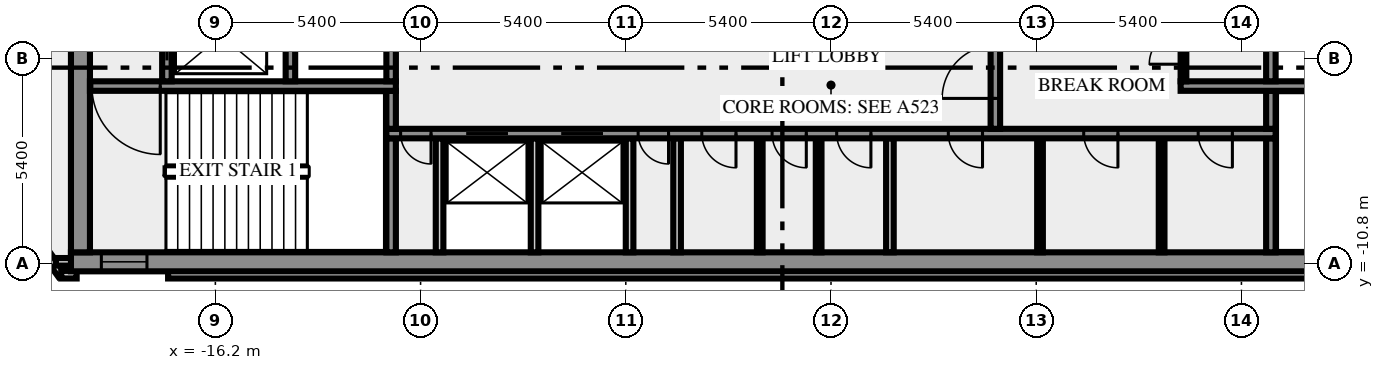
"""IFC4 building model, lengths in metres.
Left out: names, types, materials, properties, quantities, classifications, styles, units other than length and angle.
Written with IfcOpenShell. Run it as: python <this file> out.ifc"""

import sys

from ifc_helpers import new_model, si_unit, direction, frame, frame_2d, origin, place, context, subcontext, project, spatial, rectangle, extrude, element, fill, save


model = new_model("IFC4")
c1 = context("Model", 3, precision=1e-05, world=origin(), true_north=direction((0.0, 1.0)))
c2 = subcontext(c1, "Body", "Model", "MODEL_VIEW")
j1 = project(units=[si_unit("LENGTHUNIT", "METRE"), si_unit("PLANEANGLEUNIT", "RADIAN")], contexts=[c1])
p1 = place(None, origin())
s1 = spatial("IfcSite", under=j1, at=p1, CompositionType="ELEMENT")
p2 = place(p1, origin())
s2 = spatial("IfcBuilding", under=s1, at=p2, CompositionType="ELEMENT")
p3 = place(p2, frame((0.0, 0.0, 331.0)))
s3 = spatial("IfcBuildingStorey", under=s2, at=p3, CompositionType="ELEMENT", Elevation=331.0)
p4 = place(p3, frame((-21.833, -8.909, 0.0), z_axis=(0.0, 0.0, 1.0), x_axis=(0.587766567315, -0.809030569476, 0.0)))
e1 = element("IfcWall", 1, at=p4, inside=s3, PredefinedType="SOLIDWALL", context=c2, shape_type="SweptSolid", body=[
    extrude(rectangle(XDim=2.688, YDim=0.2, at=frame_2d((1.344, 0.0))), origin(), (0.0, 0.0, 1.0), 3.65),
])
p5 = place(p3, frame((-20.256, -11.088, 0.0), z_axis=(0.0, 0.0, 1.0), x_axis=(1.0, 0.0, 0.0)))
e2 = element("IfcWall", 2, at=p5, inside=s3, PredefinedType="SOLIDWALL", context=c2, shape_type="SweptSolid", body=[
    extrude(rectangle(XDim=0.406, YDim=0.2, at=frame_2d((0.203, 0.0))), origin(), (0.0, 0.0, 1.0), 3.65),
])
p6 = place(p3, frame((-17.444, -11.088, 0.0), z_axis=(0.0, 0.0, 1.0), x_axis=(1.0, 0.0, 0.0)))
e3 = element("IfcWall", 3, at=p6, inside=s3, PredefinedType="SOLIDWALL", context=c2, shape_type="SweptSolid", body=[
    extrude(rectangle(XDim=34.888, YDim=0.2, at=frame_2d((17.444, 0.0))), origin(), (0.0, 0.0, 1.0), 3.65),
])
p7 = place(p3, frame((-19.98, -10.75, 0.0), z_axis=(0.0, 0.0, 1.0), x_axis=(-1.0, 0.0, 0.0)))
e4 = element("IfcWall", 4, at=p7, inside=s3, PredefinedType="SOLIDWALL", context=c2, shape_type="SweptSolid", body=[
    extrude(rectangle(XDim=0.417, YDim=0.2, at=frame_2d((0.208, 0.0))), origin(), (0.0, 0.0, 1.0), 3.65),
])
p8 = place(p3, frame((-20.0, -10.75, 0.0), z_axis=(0.0, 0.0, 1.0), x_axis=(1.0, 0.0, 0.0)))
e5 = element("IfcWall", 5, at=p8, inside=s3, PredefinedType="SHEAR", context=c2, shape_type="SweptSolid", body=[
    extrude(rectangle(XDim=40.0, YDim=0.5, at=frame_2d((20.0, 0.0))), origin(), (0.0, 0.0, 1.0), 3.65),
])
p9 = place(p8, frame((0.8, 0.0, 1.0)))
e6 = element("IfcOpeningElement", 6, at=p9, cuts=e5, PredefinedType="OPENING", context=c2, shape_type="SweptSolid", body=[
    extrude(rectangle(XDim=1.2, YDim=1.2, at=frame_2d((0.6, 0.6))), frame((0.0, 0.26, 0.0), z_axis=(0.0, -1.0, 0.0), x_axis=(1.0, 0.0, 0.0)), (0.0, 0.0, 1.0), 0.52),
])
p10 = place(p8, frame((38.0, 0.0, 1.0)))
e7 = element("IfcOpeningElement", 7, at=p10, cuts=e5, PredefinedType="OPENING", context=c2, shape_type="SweptSolid", body=[
    extrude(rectangle(XDim=1.2, YDim=1.2, at=frame_2d((0.6, 0.6))), frame((0.0, 0.26, 0.0), z_axis=(0.0, -1.0, 0.0), x_axis=(1.0, 0.0, 0.0)), (0.0, 0.0, 1.0), 0.52),
])
p11 = place(p3, frame((-19.75, -10.5, 0.0), z_axis=(0.0, 0.0, 1.0), x_axis=(0.0, 1.0, 0.0)))
e8 = element("IfcWall", 8, at=p11, inside=s3, PredefinedType="SHEAR", context=c2, shape_type="SweptSolid", body=[
    extrude(rectangle(XDim=8.8, YDim=0.5, at=frame_2d((4.4, 0.0))), origin(), (0.0, 0.0, 1.0), 3.65),
])
p12 = place(p3, frame((-11.575, -10.5, 0.0), z_axis=(0.0, 0.0, 1.0), x_axis=(0.0, 1.0, 0.0)))
e9 = element("IfcWall", 9, at=p12, inside=s3, PredefinedType="SHEAR", context=c2, shape_type="SweptSolid", body=[
    extrude(rectangle(XDim=3.0, YDim=0.25, at=frame_2d((1.5, 0.0))), origin(), (0.0, 0.0, 1.0), 3.65),
])
for number, where, z_axis, x_axis in (
    (10, (-10.3, -10.5, 0.0), (0.0, 0.0, 1.0), (0.0, 1.0, 0.0)),
    (11, (-7.8, -10.5, 0.0), (0.0, 0.0, 1.0), (0.0, 1.0, 0.0)),
    (12, (-5.3, -10.5, 0.0), (0.0, 0.0, 1.0), (0.0, 1.0, 0.0)),
    (13, (-4.05, -10.5, 0.0), (0.0, 0.0, 1.0), (0.0, 1.0, 0.0)),
):
    element("IfcWall", number, at=place(p3, frame(where, z_axis=z_axis, x_axis=x_axis)), inside=s3, PredefinedType="SOLIDWALL", context=c2, shape_type="SweptSolid", body=[
        extrude(rectangle(XDim=3.0, YDim=0.2, at=frame_2d((1.5, 0.0))), origin(), (0.0, 0.0, 1.0), 3.65),
    ])
for number, where, z_axis, x_axis in (
    (14, (-1.875, -10.5, 0.0), (0.0, 0.0, 1.0), (0.0, 1.0, 0.0)),
    (15, (-0.325, -10.5, 0.0), (0.0, 0.0, 1.0), (0.0, 1.0, 0.0)),
):
    element("IfcWall", number, at=place(p3, frame(where, z_axis=z_axis, x_axis=x_axis)), inside=s3, PredefinedType="PARTITIONING", context=c2, shape_type="SweptSolid", body=[
        extrude(rectangle(XDim=3.0, YDim=0.15, at=frame_2d((1.5, 0.0))), origin(), (0.0, 0.0, 1.0), 3.65),
    ])
p13 = place(p3, frame((1.55, -10.5, 0.0), z_axis=(0.0, 0.0, 1.0), x_axis=(0.0, 1.0, 0.0)))
e16 = element("IfcWall", 16, at=p13, inside=s3, PredefinedType="SOLIDWALL", context=c2, shape_type="SweptSolid", body=[
    extrude(rectangle(XDim=3.0, YDim=0.2, at=frame_2d((1.5, 0.0))), origin(), (0.0, 0.0, 1.0), 3.65),
])
for number, where, z_axis, x_axis in (
    (17, (5.5, -10.5, 0.0), (0.0, 0.0, 1.0), (0.0, 1.0, 0.0)),
    (18, (8.7, -10.5, 0.0), (0.0, 0.0, 1.0), (0.0, 1.0, 0.0)),
):
    element("IfcWall", number, at=place(p3, frame(where, z_axis=z_axis, x_axis=x_axis)), inside=s3, PredefinedType="PARTITIONING", context=c2, shape_type="SweptSolid", body=[
        extrude(rectangle(XDim=3.0, YDim=0.15, at=frame_2d((1.5, 0.0))), origin(), (0.0, 0.0, 1.0), 3.65),
    ])
p14 = place(p3, frame((11.575, -10.5, 0.0), z_axis=(0.0, 0.0, 1.0), x_axis=(0.0, 1.0, 0.0)))
e19 = element("IfcWall", 19, at=p14, inside=s3, PredefinedType="SHEAR", context=c2, shape_type="SweptSolid", body=[
    extrude(rectangle(XDim=3.0, YDim=0.25, at=frame_2d((1.5, 0.0))), origin(), (0.0, 0.0, 1.0), 3.65),
])
p15 = place(p3, frame((11.7, -7.375, 0.0), z_axis=(0.0, 0.0, 1.0), x_axis=(-1.0, 0.0, 0.0)))
e20 = element("IfcWall", 20, at=p15, inside=s3, PredefinedType="SHEAR", context=c2, shape_type="SweptSolid", body=[
    extrude(rectangle(XDim=23.4, YDim=0.25, at=frame_2d((11.7, 0.0))), origin(), (0.0, 0.0, 1.0), 3.65),
])
p16 = place(p15, frame((22.225, 0.0, 0.0)))
e21 = element("IfcOpeningElement", 21, at=p16, cuts=e20, PredefinedType="OPENING", context=c2, shape_type="SweptSolid", body=[
    extrude(rectangle(XDim=0.8, YDim=2.1, at=frame_2d((0.4, 1.05))), frame((0.0, 0.135, 0.0), z_axis=(0.0, -1.0, 0.0), x_axis=(1.0, 0.0, 0.0)), (0.0, 0.0, 1.0), 0.27),
])
p17 = place(p15, frame((20.2, 0.0, 0.0)))
e22 = element("IfcOpeningElement", 22, at=p17, cuts=e20, PredefinedType="OPENING", context=c2, shape_type="SweptSolid", body=[
    extrude(rectangle(XDim=1.1, YDim=2.1, at=frame_2d((0.55, 1.05))), frame((0.0, 0.135, 0.0), z_axis=(0.0, -1.0, 0.0), x_axis=(1.0, 0.0, 0.0)), (0.0, 0.0, 1.0), 0.27),
])
p18 = place(p15, frame((17.7, 0.0, 0.0)))
e23 = element("IfcOpeningElement", 23, at=p18, cuts=e20, PredefinedType="OPENING", context=c2, shape_type="SweptSolid", body=[
    extrude(rectangle(XDim=1.1, YDim=2.1, at=frame_2d((0.55, 1.05))), frame((0.0, 0.135, 0.0), z_axis=(0.0, -1.0, 0.0), x_axis=(1.0, 0.0, 0.0)), (0.0, 0.0, 1.0), 0.27),
])
p19 = place(p15, frame((15.975, 0.0, 0.0)))
e24 = element("IfcOpeningElement", 24, at=p19, cuts=e20, PredefinedType="OPENING", context=c2, shape_type="SweptSolid", body=[
    extrude(rectangle(XDim=0.8, YDim=2.1, at=frame_2d((0.4, 1.05))), frame((0.0, 0.135, 0.0), z_axis=(0.0, -1.0, 0.0), x_axis=(1.0, 0.0, 0.0)), (0.0, 0.0, 1.0), 0.27),
])
p20 = place(p15, frame((14.2, 0.0, 0.0)))
e25 = element("IfcOpeningElement", 25, at=p20, cuts=e20, PredefinedType="OPENING", context=c2, shape_type="SweptSolid", body=[
    extrude(rectangle(XDim=0.9, YDim=2.1, at=frame_2d((0.45, 1.05))), frame((0.0, 0.135, 0.0), z_axis=(0.0, -1.0, 0.0), x_axis=(1.0, 0.0, 0.0)), (0.0, 0.0, 1.0), 0.27),
])
p21 = place(p15, frame((12.35, 0.0, 0.0)))
e26 = element("IfcOpeningElement", 26, at=p21, cuts=e20, PredefinedType="OPENING", context=c2, shape_type="SweptSolid", body=[
    extrude(rectangle(XDim=0.9, YDim=2.1, at=frame_2d((0.45, 1.05))), frame((0.0, 0.135, 0.0), z_axis=(0.0, -1.0, 0.0), x_axis=(1.0, 0.0, 0.0)), (0.0, 0.0, 1.0), 0.27),
])
p22 = place(p15, frame((10.65, 0.0, 0.0)))
e27 = element("IfcOpeningElement", 27, at=p22, cuts=e20, PredefinedType="OPENING", context=c2, shape_type="SweptSolid", body=[
    extrude(rectangle(XDim=0.9, YDim=2.1, at=frame_2d((0.45, 1.05))), frame((0.0, 0.135, 0.0), z_axis=(0.0, -1.0, 0.0), x_axis=(1.0, 0.0, 0.0)), (0.0, 0.0, 1.0), 0.27),
])
p23 = place(p15, frame((7.713, 0.0, 0.0)))
e28 = element("IfcOpeningElement", 28, at=p23, cuts=e20, PredefinedType="OPENING", context=c2, shape_type="SweptSolid", body=[
    extrude(rectangle(XDim=0.9, YDim=2.1, at=frame_2d((0.45, 1.05))), frame((0.0, 0.135, 0.0), z_axis=(0.0, -1.0, 0.0), x_axis=(1.0, 0.0, 0.0)), (0.0, 0.0, 1.0), 0.27),
])
p24 = place(p15, frame((4.15, 0.0, 0.0)))
e29 = element("IfcOpeningElement", 29, at=p24, cuts=e20, PredefinedType="OPENING", context=c2, shape_type="SweptSolid", body=[
    extrude(rectangle(XDim=0.9, YDim=2.1, at=frame_2d((0.45, 1.05))), frame((0.0, 0.135, 0.0), z_axis=(0.0, -1.0, 0.0), x_axis=(1.0, 0.0, 0.0)), (0.0, 0.0, 1.0), 0.27),
])
p25 = place(p15, frame((1.138, 0.0, 0.0)))
e30 = element("IfcOpeningElement", 30, at=p25, cuts=e20, PredefinedType="OPENING", context=c2, shape_type="SweptSolid", body=[
    extrude(rectangle(XDim=0.9, YDim=2.1, at=frame_2d((0.45, 1.05))), frame((0.0, 0.135, 0.0), z_axis=(0.0, -1.0, 0.0), x_axis=(1.0, 0.0, 0.0)), (0.0, 0.0, 1.0), 0.27),
])
p26 = place(p3, frame((-11.575, -7.25, 0.0), z_axis=(0.0, 0.0, 1.0), x_axis=(0.0, 1.0, 0.0)))
e31 = element("IfcWall", 31, at=p26, inside=s3, PredefinedType="SHEAR", context=c2, shape_type="SweptSolid", body=[
    extrude(rectangle(XDim=1.0, YDim=0.25, at=frame_2d((0.5, 0.0))), origin(), (0.0, 0.0, 1.0), 3.65),
])
p27 = place(p3, frame((4.325, -7.25, 0.0), z_axis=(0.0, 0.0, 1.0), x_axis=(0.0, 1.0, 0.0)))
e32 = element("IfcWall", 32, at=p27, inside=s3, PredefinedType="SHEAR", context=c2, shape_type="SweptSolid", body=[
    extrude(rectangle(XDim=3.0, YDim=0.25, at=frame_2d((1.5, 0.0))), origin(), (0.0, 0.0, 1.0), 3.65),
])
p28 = place(p27, frame((0.8, 0.0, 0.0)))
e33 = element("IfcOpeningElement", 33, at=p28, cuts=e32, PredefinedType="OPENING", context=c2, shape_type="SweptSolid", body=[
    extrude(rectangle(XDim=1.4, YDim=2.1, at=frame_2d((0.7, 1.05))), frame((0.0, 0.135, 0.0), z_axis=(0.0, -1.0, 0.0), x_axis=(1.0, 0.0, 0.0)), (0.0, 0.0, 1.0), 0.27),
])
p29 = place(p3, frame((11.575, -7.25, 0.0), z_axis=(0.0, 0.0, 1.0), x_axis=(0.0, 1.0, 0.0)))
e34 = element("IfcWall", 34, at=p29, inside=s3, PredefinedType="SHEAR", context=c2, shape_type="SweptSolid", body=[
    extrude(rectangle(XDim=1.0, YDim=0.25, at=frame_2d((0.5, 0.0))), origin(), (0.0, 0.0, 1.0), 3.65),
])
p30 = place(p3, frame((-11.45, -6.125, 0.0), z_axis=(0.0, 0.0, 1.0), x_axis=(-1.0, 0.0, 0.0)))
e35 = element("IfcWall", 35, at=p30, inside=s3, PredefinedType="SHEAR", context=c2, shape_type="SweptSolid", body=[
    extrude(rectangle(XDim=8.05, YDim=0.25, at=frame_2d((4.025, 0.0))), origin(), (0.0, 0.0, 1.0), 3.65),
])
p31 = place(p30, frame((6.2, 0.0, 0.0)))
e36 = element("IfcOpeningElement", 36, at=p31, cuts=e35, PredefinedType="OPENING", context=c2, shape_type="SweptSolid", body=[
    extrude(rectangle(XDim=1.8, YDim=2.1, at=frame_2d((0.9, 1.05))), frame((0.0, 0.135, 0.0), z_axis=(0.0, -1.0, 0.0), x_axis=(1.0, 0.0, 0.0)), (0.0, 0.0, 1.0), 0.27),
])
p32 = place(p3, frame((20.0, -6.125, 0.0), z_axis=(0.0, 0.0, 1.0), x_axis=(-1.0, 0.0, 0.0)))
e37 = element("IfcWall", 37, at=p32, inside=s3, PredefinedType="SHEAR", context=c2, shape_type="SweptSolid", body=[
    extrude(rectangle(XDim=10.8, YDim=0.25, at=frame_2d((5.4, 0.0))), origin(), (0.0, 0.0, 1.0), 3.65),
])
p33 = place(p32, frame((0.55, 0.0, 0.0)))
e38 = element("IfcOpeningElement", 38, at=p33, cuts=e37, PredefinedType="OPENING", context=c2, shape_type="SweptSolid", body=[
    extrude(rectangle(XDim=1.8, YDim=2.1, at=frame_2d((0.9, 1.05))), frame((0.0, 0.135, 0.0), z_axis=(0.0, -1.0, 0.0), x_axis=(1.0, 0.0, 0.0)), (0.0, 0.0, 1.0), 0.27),
])
p34 = place(p3, frame((-17.475, -6.0, 0.0), z_axis=(0.0, 0.0, 1.0), x_axis=(0.0, 1.0, 0.0)))
e39 = element("IfcWall", 39, at=p34, inside=s3, PredefinedType="SHEAR", context=c2, shape_type="SweptSolid", body=[
    extrude(rectangle(XDim=4.3, YDim=0.25, at=frame_2d((2.15, 0.0))), origin(), (0.0, 0.0, 1.0), 3.65),
])
p35 = place(p34, frame((0.55, 0.0, 0.0)))
e40 = element("IfcOpeningElement", 40, at=p35, cuts=e39, PredefinedType="OPENING", context=c2, shape_type="SweptSolid", body=[
    extrude(rectangle(XDim=1.3, YDim=2.1, at=frame_2d((0.65, 1.05))), frame((0.0, 0.135, 0.0), z_axis=(0.0, -1.0, 0.0), x_axis=(1.0, 0.0, 0.0)), (0.0, 0.0, 1.0), 0.27),
])
p36 = place(p3, frame((-14.225, -6.0, 0.0), z_axis=(0.0, 0.0, 1.0), x_axis=(0.0, 1.0, 0.0)))
e41 = element("IfcWall", 41, at=p36, inside=s3, PredefinedType="SHEAR", context=c2, shape_type="SweptSolid", body=[
    extrude(rectangle(XDim=4.3, YDim=0.25, at=frame_2d((2.15, 0.0))), origin(), (0.0, 0.0, 1.0), 3.65),
])
p37 = place(p3, frame((-11.575, -6.0, 0.0), z_axis=(0.0, 0.0, 1.0), x_axis=(0.0, 1.0, 0.0)))
e42 = element("IfcWall", 42, at=p37, inside=s3, PredefinedType="SHEAR", context=c2, shape_type="SweptSolid", body=[
    extrude(rectangle(XDim=1.75, YDim=0.25, at=frame_2d((0.875, 0.0))), origin(), (0.0, 0.0, 1.0), 3.65),
])
p38 = place(p3, frame((9.275, -6.0, 0.0), z_axis=(0.0, 0.0, 1.0), x_axis=(0.0, 1.0, 0.0)))
e43 = element("IfcWall", 43, at=p38, inside=s3, PredefinedType="PARTITIONING", context=c2, shape_type="SweptSolid", body=[
    extrude(rectangle(XDim=1.75, YDim=0.15, at=frame_2d((0.875, 0.0))), origin(), (0.0, 0.0, 1.0), 3.65),
])
p39 = place(p38, frame((0.45, 0.0, 0.0)))
e44 = element("IfcOpeningElement", 44, at=p39, cuts=e43, PredefinedType="OPENING", context=c2, shape_type="SweptSolid", body=[
    extrude(rectangle(XDim=0.9, YDim=2.1, at=frame_2d((0.45, 1.05))), frame((0.0, 0.085, 0.0), z_axis=(0.0, -1.0, 0.0), x_axis=(1.0, 0.0, 0.0)), (0.0, 0.0, 1.0), 0.17),
])
p40 = place(p3, frame((11.575, -6.0, 0.0), z_axis=(0.0, 0.0, 1.0), x_axis=(0.0, 1.0, 0.0)))
e45 = element("IfcWall", 45, at=p40, inside=s3, PredefinedType="SHEAR", context=c2, shape_type="SweptSolid", body=[
    extrude(rectangle(XDim=1.75, YDim=0.25, at=frame_2d((0.875, 0.0))), origin(), (0.0, 0.0, 1.0), 3.65),
])
p41 = place(p9, origin())
e46 = element("IfcWindow", 46, at=p41, inside=s3, PartitioningType="SINGLE_PANEL", PredefinedType="WINDOW", context=c2, shape_type="SweptSolid", body=[
    extrude(rectangle(XDim=1.2, YDim=1.2, at=frame_2d((0.6, 0.6))), frame((0.0, 0.03, 0.0), z_axis=(0.0, -1.0, 0.0), x_axis=(1.0, 0.0, 0.0)), (0.0, 0.0, 1.0), 0.06),
])
fill(e6, e46)
p42 = place(p16, origin())
e47 = element("IfcDoor", 47, at=p42, inside=s3, OperationType="SINGLE_SWING_RIGHT", PredefinedType="DOOR", context=c2, shape_type="SweptSolid", body=[
    extrude(rectangle(XDim=0.8, YDim=2.1, at=frame_2d((0.4, 1.05))), frame((0.0, 0.025, 0.0), z_axis=(0.0, -1.0, 0.0), x_axis=(1.0, 0.0, 0.0)), (0.0, 0.0, 1.0), 0.05),
])
fill(e21, e47)
p43 = place(p17, origin())
e48 = element("IfcDoor", 48, at=p43, inside=s3, OperationType="DOUBLE_DOOR_SLIDING", PredefinedType="DOOR", context=c2, shape_type="SweptSolid", body=[
    extrude(rectangle(XDim=1.1, YDim=2.1, at=frame_2d((0.55, 1.05))), frame((0.0, 0.025, 0.0), z_axis=(0.0, -1.0, 0.0), x_axis=(1.0, 0.0, 0.0)), (0.0, 0.0, 1.0), 0.05),
])
fill(e22, e48)
p44 = place(p18, origin())
e49 = element("IfcDoor", 49, at=p44, inside=s3, OperationType="DOUBLE_DOOR_SLIDING", PredefinedType="DOOR", context=c2, shape_type="SweptSolid", body=[
    extrude(rectangle(XDim=1.1, YDim=2.1, at=frame_2d((0.55, 1.05))), frame((0.0, 0.025, 0.0), z_axis=(0.0, -1.0, 0.0), x_axis=(1.0, 0.0, 0.0)), (0.0, 0.0, 1.0), 0.05),
])
fill(e23, e49)
p45 = place(p19, origin())
e50 = element("IfcDoor", 50, at=p45, inside=s3, OperationType="SINGLE_SWING_RIGHT", PredefinedType="DOOR", context=c2, shape_type="SweptSolid", body=[
    extrude(rectangle(XDim=0.8, YDim=2.1, at=frame_2d((0.4, 1.05))), frame((0.0, 0.025, 0.0), z_axis=(0.0, -1.0, 0.0), x_axis=(1.0, 0.0, 0.0)), (0.0, 0.0, 1.0), 0.05),
])
fill(e24, e50)
p46 = place(p20, origin())
e51 = element("IfcDoor", 51, at=p46, inside=s3, OperationType="SINGLE_SWING_RIGHT", PredefinedType="DOOR", context=c2, shape_type="SweptSolid", body=[
    extrude(rectangle(XDim=0.9, YDim=2.1, at=frame_2d((0.45, 1.05))), frame((0.0, 0.025, 0.0), z_axis=(0.0, -1.0, 0.0), x_axis=(1.0, 0.0, 0.0)), (0.0, 0.0, 1.0), 0.05),
])
fill(e25, e51)
p47 = place(p21, origin())
e52 = element("IfcDoor", 52, at=p47, inside=s3, OperationType="SINGLE_SWING_RIGHT", PredefinedType="DOOR", context=c2, shape_type="SweptSolid", body=[
    extrude(rectangle(XDim=0.9, YDim=2.1, at=frame_2d((0.45, 1.05))), frame((0.0, 0.025, 0.0), z_axis=(0.0, -1.0, 0.0), x_axis=(1.0, 0.0, 0.0)), (0.0, 0.0, 1.0), 0.05),
])
fill(e26, e52)
p48 = place(p22, origin())
e53 = element("IfcDoor", 53, at=p48, inside=s3, OperationType="SINGLE_SWING_LEFT", PredefinedType="DOOR", context=c2, shape_type="SweptSolid", body=[
    extrude(rectangle(XDim=0.9, YDim=2.1, at=frame_2d((0.45, 1.05))), frame((0.0, 0.025, 0.0), z_axis=(0.0, -1.0, 0.0), x_axis=(1.0, 0.0, 0.0)), (0.0, 0.0, 1.0), 0.05),
])
fill(e27, e53)
p49 = place(p23, origin())
e54 = element("IfcDoor", 54, at=p49, inside=s3, OperationType="SINGLE_SWING_LEFT", PredefinedType="DOOR", context=c2, shape_type="SweptSolid", body=[
    extrude(rectangle(XDim=0.9, YDim=2.1, at=frame_2d((0.45, 1.05))), frame((0.0, 0.025, 0.0), z_axis=(0.0, -1.0, 0.0), x_axis=(1.0, 0.0, 0.0)), (0.0, 0.0, 1.0), 0.05),
])
fill(e28, e54)
p50 = place(p24, origin())
e55 = element("IfcDoor", 55, at=p50, inside=s3, OperationType="SINGLE_SWING_LEFT", PredefinedType="DOOR", context=c2, shape_type="SweptSolid", body=[
    extrude(rectangle(XDim=0.9, YDim=2.1, at=frame_2d((0.45, 1.05))), frame((0.0, 0.025, 0.0), z_axis=(0.0, -1.0, 0.0), x_axis=(1.0, 0.0, 0.0)), (0.0, 0.0, 1.0), 0.05),
])
fill(e29, e55)
p51 = place(p25, origin())
e56 = element("IfcDoor", 56, at=p51, inside=s3, OperationType="SINGLE_SWING_LEFT", PredefinedType="DOOR", context=c2, shape_type="SweptSolid", body=[
    extrude(rectangle(XDim=0.9, YDim=2.1, at=frame_2d((0.45, 1.05))), frame((0.0, 0.025, 0.0), z_axis=(0.0, -1.0, 0.0), x_axis=(1.0, 0.0, 0.0)), (0.0, 0.0, 1.0), 0.05),
])
fill(e30, e56)
p52 = place(p28, origin())
e57 = element("IfcDoor", 57, at=p52, inside=s3, OperationType="DOUBLE_DOOR_SINGLE_SWING", PredefinedType="DOOR", context=c2, shape_type="SweptSolid", body=[
    extrude(rectangle(XDim=1.4, YDim=2.1, at=frame_2d((0.7, 1.05))), frame((0.0, 0.025, 0.0), z_axis=(0.0, -1.0, 0.0), x_axis=(1.0, 0.0, 0.0)), (0.0, 0.0, 1.0), 0.05),
])
fill(e33, e57)
p53 = place(p31, origin())
e58 = element("IfcDoor", 58, at=p53, inside=s3, OperationType="DOUBLE_DOOR_SINGLE_SWING", PredefinedType="DOOR", context=c2, shape_type="SweptSolid", body=[
    extrude(rectangle(XDim=1.8, YDim=2.1, at=frame_2d((0.9, 1.05))), frame((0.0, 0.025, 0.0), z_axis=(0.0, -1.0, 0.0), x_axis=(1.0, 0.0, 0.0)), (0.0, 0.0, 1.0), 0.05),
])
fill(e36, e58)
p54 = place(p35, origin())
e59 = element("IfcDoor", 59, at=p54, inside=s3, OperationType="DOUBLE_DOOR_SLIDING", PredefinedType="DOOR", context=c2, shape_type="SweptSolid", body=[
    extrude(rectangle(XDim=1.3, YDim=2.1, at=frame_2d((0.65, 1.05))), frame((0.0, 0.025, 0.0), z_axis=(0.0, -1.0, 0.0), x_axis=(1.0, 0.0, 0.0)), (0.0, 0.0, 1.0), 0.05),
])
fill(e40, e59)
p55 = place(p39, origin())
e60 = element("IfcDoor", 60, at=p55, inside=s3, OperationType="SINGLE_SWING_RIGHT", PredefinedType="DOOR", context=c2, shape_type="SweptSolid", body=[
    extrude(rectangle(XDim=0.9, YDim=2.1, at=frame_2d((0.45, 1.05))), frame((0.0, 0.025, 0.0), z_axis=(0.0, -1.0, 0.0), x_axis=(1.0, 0.0, 0.0)), (0.0, 0.0, 1.0), 0.05),
])
fill(e44, e60)
save(model, sys.argv[1])
